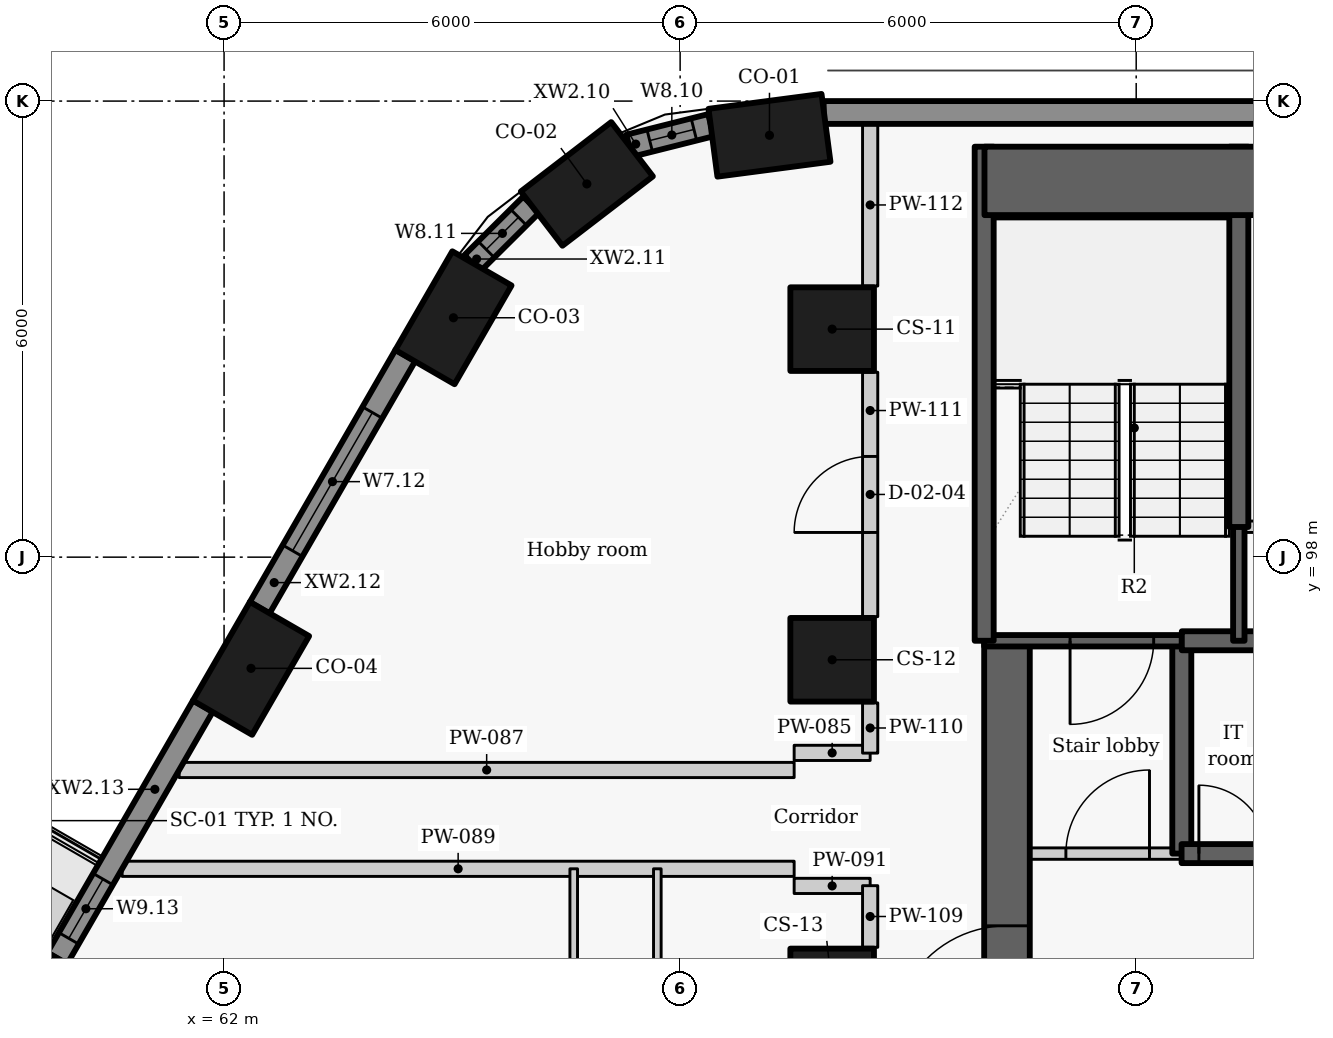
"""IFC4 building model, lengths in metres.
Left out: names, types, materials, properties, quantities, classifications, styles, units other than length and angle.
Written with IfcOpenShell. Run it as: python <this file> out.ifc"""

import sys

from ifc_helpers import new_model, si_unit, direction, frame, frame_2d, origin, origin_2d, place, context, subcontext, project, spatial, rectangle, extrude, element, fill, save


model = new_model("IFC4")
c1 = context("Model", 3, precision=1e-05, world=origin(), true_north=direction((0.0, 1.0)))
c2 = subcontext(c1, "Body", "Model", "MODEL_VIEW")
j1 = project(units=[si_unit("LENGTHUNIT", "METRE"), si_unit("PLANEANGLEUNIT", "RADIAN")], contexts=[c1])
p1 = place(None, origin())
s1 = spatial("IfcSite", under=j1, at=p1, CompositionType="ELEMENT")
p2 = place(p1, origin())
s2 = spatial("IfcBuilding", under=s1, at=p2, CompositionType="ELEMENT")
p3 = place(p2, frame((0.0, 0.0, 44.7)))
s3 = spatial("IfcBuildingStorey", under=s2, at=p3, CompositionType="ELEMENT", Elevation=44.7)
for number, where, z_axis, x_axis in (
    (1, (69.175, 103.55, 0.0), (0.0, 0.0, 1.0), (-0.991, -0.131, 0.0)),
    (2, (66.773, 102.91, 0.0), (0.0, 0.0, 1.0), (-0.793, -0.609, 0.0)),
    (3, (65.018, 101.149, 0.0), (0.0, 0.0, 1.0), (-0.5, -0.866, 0.0)),
    (4, (62.354, 96.537, 0.0), (0.0, 0.0, 1.0), (-0.5, -0.866, 0.0)),
    (5, (59.692, 91.925, 0.0), (0.0, 0.0, 1.0), (-0.5, -0.866, 0.0)),
):
    element("IfcColumn", number, at=place(p3, frame(where, z_axis=z_axis, x_axis=x_axis)), inside=s3, PredefinedType="COLUMN", context=c2, shape_type="SweptSolid", body=[
        extrude(rectangle(XDim=1.5, YDim=0.9, at=origin_2d()), origin(), (0.0, 0.0, 1.0), 3.3),
    ])
for number, where, z_axis, x_axis in (
    (6, (70.0, 101.0, 0.0), (0.0, 0.0, 1.0), (0.0, -1.0, 0.0)),
    (7, (70.0, 96.65, 0.0), (0.0, 0.0, 1.0), (0.0, -1.0, 0.0)),
    (8, (70.0, 92.3, 0.0), (0.0, 0.0, 1.0), (0.0, -1.0, 0.0)),
):
    element("IfcColumn", number, at=place(p3, frame(where, z_axis=z_axis, x_axis=x_axis)), inside=s3, PredefinedType="COLUMN", context=c2, shape_type="SweptSolid", body=[
        extrude(rectangle(XDim=1.1, YDim=1.1, at=origin_2d()), origin(), (0.0, 0.0, 1.0), 3.3),
    ])
p4 = place(p3, frame((90.079, 103.85, 0.0), z_axis=(0.0, 0.0, 1.0), x_axis=(-1.0, 0.0, 0.0)))
e9 = element("IfcWall", 9, at=p4, inside=s3, PredefinedType="SOLIDWALL", context=c2, shape_type="SweptSolid", body=[
    extrude(rectangle(XDim=20.19, YDim=0.3, at=frame_2d((10.095, 0.0))), origin(), (0.0, 0.0, 1.0), 2.425),
])
p5 = place(p3, frame((68.405, 103.683, 0.0), z_axis=(0.0, 0.0, 1.0), x_axis=(-0.969766298956, -0.244035500304, 0.0)))
e10 = element("IfcWall", 10, at=p5, inside=s3, PredefinedType="SOLIDWALL", context=c2, shape_type="SweptSolid", body=[
    extrude(rectangle(XDim=1.111, YDim=0.3, at=frame_2d((0.555, 0.0))), origin(), (0.0, 0.0, 1.0), 2.425),
])
p6 = place(p5, frame((0.231, 0.0, 0.9)))
e11 = element("IfcOpeningElement", 11, at=p6, cuts=e10, PredefinedType="OPENING", context=c2, shape_type="SweptSolid", body=[
    extrude(rectangle(XDim=0.6, YDim=1.1, at=frame_2d((0.3, 0.55))), frame((0.0, 0.16, 0.0), z_axis=(0.0, -1.0, 0.0), x_axis=(1.0, 0.0, 0.0)), (0.0, 0.0, 1.0), 0.32),
])
p7 = place(p3, frame((66.042, 102.637, 0.0), z_axis=(0.0, 0.0, 1.0), x_axis=(-0.708892395813, -0.705316646024, 0.0)))
e12 = element("IfcWall", 12, at=p7, inside=s3, PredefinedType="SOLIDWALL", context=c2, shape_type="SweptSolid", body=[
    extrude(rectangle(XDim=1.093, YDim=0.3, at=frame_2d((0.546, 0.0))), origin(), (0.0, 0.0, 1.0), 2.425),
])
p8 = place(p7, frame((0.236, 0.0, 0.9)))
e13 = element("IfcOpeningElement", 13, at=p8, cuts=e12, PredefinedType="OPENING", context=c2, shape_type="SweptSolid", body=[
    extrude(rectangle(XDim=0.6, YDim=1.1, at=frame_2d((0.3, 0.55))), frame((0.0, 0.16, 0.0), z_axis=(0.0, -1.0, 0.0), x_axis=(1.0, 0.0, 0.0)), (0.0, 0.0, 1.0), 0.32),
])
p9 = place(p3, frame((64.385, 100.654, 0.0), z_axis=(0.0, 0.0, 1.0), x_axis=(-0.499974163209, -0.866040320149, 0.0)))
e14 = element("IfcWall", 14, at=p9, inside=s3, PredefinedType="SOLIDWALL", context=c2, shape_type="SweptSolid", body=[
    extrude(rectangle(XDim=3.834, YDim=0.3, at=frame_2d((1.917, 0.0))), origin(), (0.0, 0.0, 1.0), 2.425),
])
p10 = place(p9, frame((0.867, 0.0, 0.9)))
e15 = element("IfcOpeningElement", 15, at=p10, cuts=e14, PredefinedType="OPENING", context=c2, shape_type="SweptSolid", body=[
    extrude(rectangle(XDim=2.1, YDim=1.1, at=frame_2d((1.05, 0.55))), frame((0.0, 0.16, 0.0), z_axis=(0.0, -1.0, 0.0), x_axis=(1.0, 0.0, 0.0)), (0.0, 0.0, 1.0), 0.32),
])
p11 = place(p3, frame((61.722, 96.041, 0.0), z_axis=(0.0, 0.0, 1.0), x_axis=(-0.500001735503, -0.866024401789, 0.0)))
e16 = element("IfcWall", 16, at=p11, inside=s3, PredefinedType="SOLIDWALL", context=c2, shape_type="SweptSolid", body=[
    extrude(rectangle(XDim=3.834, YDim=0.3, at=frame_2d((1.917, 0.0))), origin(), (0.0, 0.0, 1.0), 2.425),
])
p12 = place(p11, frame((2.629, 0.0, 0.9)))
e17 = element("IfcOpeningElement", 17, at=p12, cuts=e16, PredefinedType="OPENING", context=c2, shape_type="SweptSolid", body=[
    extrude(rectangle(XDim=0.9, YDim=1.1, at=frame_2d((0.45, 0.55))), frame((0.0, 0.16, 0.0), z_axis=(0.0, -1.0, 0.0), x_axis=(1.0, 0.0, 0.0)), (0.0, 0.0, 1.0), 0.32),
])
p13 = place(p3, frame((74.6, 94.1, -0.275), z_axis=(0.0, 0.0, 1.0), x_axis=(0.0, 1.0, 0.0)))
e18 = element("IfcWall", 18, at=p13, inside=s3, PredefinedType="SHEAR", context=c2, shape_type="SweptSolid", body=[
    extrude(rectangle(XDim=2.8, YDim=0.25, at=frame_2d((1.4, 0.0))), origin(), (0.0, 0.0, 1.0), 3.3),
])
p14 = place(p3, frame((72.3, 87.8, -0.275), z_axis=(0.0, 0.0, 1.0), x_axis=(0.0, 1.0, 0.0)))
e19 = element("IfcWall", 19, at=p14, inside=s3, PredefinedType="SHEAR", context=c2, shape_type="SweptSolid", body=[
    extrude(rectangle(XDim=9.1, YDim=0.6, at=frame_2d((4.55, 0.0))), origin(), (0.0, 0.0, 1.0), 3.3),
])
p15 = place(p14, frame((3.85, 0.0, 0.275)))
e20 = element("IfcOpeningElement", 20, at=p15, cuts=e19, PredefinedType="OPENING", context=c2, shape_type="SweptSolid", body=[
    extrude(rectangle(XDim=1.5, YDim=2.1, at=frame_2d((0.75, 1.05))), frame((0.0, 0.31, 0.0), z_axis=(0.0, -1.0, 0.0), x_axis=(1.0, 0.0, 0.0)), (0.0, 0.0, 1.0), 0.62),
])
p16 = place(p3, frame((72.0, 94.1, 0.0), z_axis=(0.0, 0.0, 1.0), x_axis=(1.0, 0.0, 0.0)))
e21 = element("IfcWall", 21, at=p16, inside=s3, PredefinedType="PARTITIONING", context=c2, shape_type="SweptSolid", body=[
    extrude(rectangle(XDim=2.603, YDim=0.15, at=frame_2d((1.302, 0.0))), origin(), (0.0, 0.0, 1.0), 3.025),
])
p17 = place(p16, frame((1.075, 0.0, 0.0)))
e22 = element("IfcOpeningElement", 22, at=p17, cuts=e21, PredefinedType="OPENING", context=c2, shape_type="SweptSolid", body=[
    extrude(rectangle(XDim=1.1, YDim=2.1, at=frame_2d((0.55, 1.05))), frame((0.0, 0.085, 0.0), z_axis=(0.0, -1.0, 0.0), x_axis=(1.0, 0.0, 0.0)), (0.0, 0.0, 1.0), 0.17),
])
p18 = place(p3, frame((74.597, 94.1, -0.275), z_axis=(0.0, 0.0, 1.0), x_axis=(1.0, 0.0, 0.0)))
e23 = element("IfcWall", 23, at=p18, inside=s3, PredefinedType="SHEAR", context=c2, shape_type="SweptSolid", body=[
    extrude(rectangle(XDim=2.706, YDim=0.25, at=frame_2d((1.353, 0.0))), origin(), (0.0, 0.0, 1.0), 3.3),
])
p19 = place(p18, frame((0.228, 0.0, 0.275)))
e24 = element("IfcOpeningElement", 24, at=p19, cuts=e23, PredefinedType="OPENING", context=c2, shape_type="SweptSolid", body=[
    extrude(rectangle(XDim=0.9, YDim=2.1, at=frame_2d((0.45, 1.05))), frame((0.0, 0.135, 0.0), z_axis=(0.0, -1.0, 0.0), x_axis=(1.0, 0.0, 0.0)), (0.0, 0.0, 1.0), 0.27),
])
p20 = place(p18, frame((1.578, 0.0, 0.275)))
e25 = element("IfcOpeningElement", 25, at=p20, cuts=e23, PredefinedType="OPENING", context=c2, shape_type="SweptSolid", body=[
    extrude(rectangle(XDim=0.9, YDim=2.1, at=frame_2d((0.45, 1.05))), frame((0.0, 0.135, 0.0), z_axis=(0.0, -1.0, 0.0), x_axis=(1.0, 0.0, 0.0)), (0.0, 0.0, 1.0), 0.27),
])
p21 = place(p3, frame((74.6, 96.9, -0.275), z_axis=(0.0, 0.0, 1.0), x_axis=(-1.0, 0.0, 0.0)))
e26 = element("IfcWall", 26, at=p21, inside=s3, PredefinedType="SHEAR", context=c2, shape_type="SweptSolid", body=[
    extrude(rectangle(XDim=2.6, YDim=0.15, at=frame_2d((1.3, 0.0))), origin(), (0.0, 0.0, 1.0), 3.3),
])
p22 = place(p21, frame((0.37, 0.0, 0.275)))
e27 = element("IfcOpeningElement", 27, at=p22, cuts=e26, PredefinedType="OPENING", context=c2, shape_type="SweptSolid", body=[
    extrude(rectangle(XDim=1.1, YDim=2.1, at=frame_2d((0.55, 1.05))), frame((0.0, 0.085, 0.0), z_axis=(0.0, -1.0, 0.0), x_axis=(1.0, 0.0, 0.0)), (0.0, 0.0, 1.0), 0.17),
])
p23 = place(p3, frame((74.6, 96.9, -0.275), z_axis=(0.0, 0.0, 1.0), x_axis=(1.0, 0.0, 0.0)))
e28 = element("IfcWall", 28, at=p23, inside=s3, PredefinedType="SHEAR", context=c2, shape_type="SweptSolid", body=[
    extrude(rectangle(XDim=2.7, YDim=0.25, at=frame_2d((1.35, 0.0))), origin(), (0.0, 0.0, 1.0), 3.3),
])
p24 = place(p3, frame((75.35, 96.9, -0.275), z_axis=(0.0, 0.0, 1.0), x_axis=(0.0, 1.0, 0.0)))
e29 = element("IfcWall", 29, at=p24, inside=s3, PredefinedType="SHEAR", context=c2, shape_type="SweptSolid", body=[
    extrude(rectangle(XDim=1.503, YDim=0.15, at=frame_2d((0.751, 0.0))), origin(), (0.0, 0.0, 1.0), 3.3),
])
p25 = place(p3, frame((75.35, 98.397, -0.275), z_axis=(0.0, 0.0, 1.0), x_axis=(0.0, 1.0, 0.0)))
e30 = element("IfcWall", 30, at=p25, inside=s3, PredefinedType="SHEAR", context=c2, shape_type="SweptSolid", body=[
    extrude(rectangle(XDim=5.003, YDim=0.25, at=frame_2d((2.501, 0.0))), origin(), (0.0, 0.0, 1.0), 3.3),
])
p26 = place(p3, frame((72.0, 96.9, -0.275), z_axis=(0.0, 0.0, 1.0), x_axis=(0.0, 1.0, 0.0)))
e31 = element("IfcWall", 31, at=p26, inside=s3, PredefinedType="SHEAR", context=c2, shape_type="SweptSolid", body=[
    extrude(rectangle(XDim=6.5, YDim=0.25, at=frame_2d((3.25, 0.0))), origin(), (0.0, 0.0, 1.0), 3.3),
])
p27 = place(p3, frame((75.35, 98.4, 0.0), z_axis=(0.0, 0.0, 1.0), x_axis=(1.0, 0.0, 0.0)))
e32 = element("IfcWall", 32, at=p27, inside=s3, PredefinedType="PARTITIONING", context=c2, shape_type="SweptSolid", body=[
    extrude(rectangle(XDim=5.2, YDim=0.15, at=frame_2d((2.6, 0.0))), origin(), (0.0, 0.0, 1.0), 3.025),
])
p28 = place(p27, frame((0.434, 0.0, 0.0)))
e33 = element("IfcOpeningElement", 33, at=p28, cuts=e32, PredefinedType="OPENING", context=c2, shape_type="SweptSolid", body=[
    extrude(rectangle(XDim=0.9, YDim=2.1, at=frame_2d((0.45, 1.05))), frame((0.0, 0.085, 0.0), z_axis=(0.0, -1.0, 0.0), x_axis=(1.0, 0.0, 0.0)), (0.0, 0.0, 1.0), 0.17),
])
p29 = place(p27, frame((2.176, 0.0, 0.0)))
e34 = element("IfcOpeningElement", 34, at=p29, cuts=e32, PredefinedType="OPENING", context=c2, shape_type="SweptSolid", body=[
    extrude(rectangle(XDim=0.9, YDim=2.1, at=frame_2d((0.45, 1.05))), frame((0.0, 0.085, 0.0), z_axis=(0.0, -1.0, 0.0), x_axis=(1.0, 0.0, 0.0)), (0.0, 0.0, 1.0), 0.17),
])
p30 = place(p27, frame((3.892, 0.0, 0.0)))
e35 = element("IfcOpeningElement", 35, at=p30, cuts=e32, PredefinedType="OPENING", context=c2, shape_type="SweptSolid", body=[
    extrude(rectangle(XDim=0.9, YDim=2.1, at=frame_2d((0.45, 1.05))), frame((0.0, 0.085, 0.0), z_axis=(0.0, -1.0, 0.0), x_axis=(1.0, 0.0, 0.0)), (0.0, 0.0, 1.0), 0.17),
])
p31 = place(p3, frame((69.5, 95.425, 0.0), z_axis=(0.0, 0.0, 1.0), x_axis=(1.0, 0.0, 0.0)))
e36 = element("IfcWall", 36, at=p31, inside=s3, PredefinedType="PARTITIONING", context=c2, shape_type="SweptSolid", body=[
    extrude(rectangle(XDim=1.0, YDim=0.2, at=frame_2d((0.5, 0.0))), origin(), (0.0, 0.0, 1.0), 2.505),
])
p32 = place(p3, frame((61.409, 95.2, 0.0), z_axis=(0.0, 0.0, 1.0), x_axis=(1.0, 0.0, 0.0)))
e37 = element("IfcWall", 37, at=p32, inside=s3, PredefinedType="PARTITIONING", context=c2, shape_type="SweptSolid", body=[
    extrude(rectangle(XDim=8.091, YDim=0.2, at=frame_2d((4.045, 0.0))), origin(), (0.0, 0.0, 1.0), 2.405),
])
p33 = place(p3, frame((60.659, 93.9, 0.0), z_axis=(0.0, 0.0, 1.0), x_axis=(1.0, 0.0, 0.0)))
e38 = element("IfcWall", 38, at=p33, inside=s3, PredefinedType="PARTITIONING", context=c2, shape_type="SweptSolid", body=[
    extrude(rectangle(XDim=8.841, YDim=0.2, at=frame_2d((4.421, 0.0))), origin(), (0.0, 0.0, 1.0), 2.405),
])
p34 = place(p3, frame((69.5, 93.675, 0.0), z_axis=(0.0, 0.0, 1.0), x_axis=(1.0, 0.0, 0.0)))
e39 = element("IfcWall", 39, at=p34, inside=s3, PredefinedType="PARTITIONING", context=c2, shape_type="SweptSolid", body=[
    extrude(rectangle(XDim=1.0, YDim=0.2, at=frame_2d((0.5, 0.0))), origin(), (0.0, 0.0, 1.0), 2.505),
])
p35 = place(p3, frame((70.5, 92.867, 0.0), z_axis=(0.0, 0.0, 1.0), x_axis=(0.0, 1.0, 0.0)))
e40 = element("IfcWall", 40, at=p35, inside=s3, PredefinedType="PARTITIONING", context=c2, shape_type="SweptSolid", body=[
    extrude(rectangle(XDim=0.811, YDim=0.2, at=frame_2d((0.406, 0.0))), origin(), (0.0, 0.0, 1.0), 3.025),
])
p36 = place(p3, frame((70.5, 95.422, 0.0), z_axis=(0.0, 0.0, 1.0), x_axis=(0.0, 1.0, 0.0)))
e41 = element("IfcWall", 41, at=p36, inside=s3, PredefinedType="PARTITIONING", context=c2, shape_type="SweptSolid", body=[
    extrude(rectangle(XDim=0.661, YDim=0.2, at=frame_2d((0.331, 0.0))), origin(), (0.0, 0.0, 1.0), 3.025),
])
p37 = place(p3, frame((70.5, 97.217, 0.0), z_axis=(0.0, 0.0, 1.0), x_axis=(0.0, 1.0, 0.0)))
e42 = element("IfcWall", 42, at=p37, inside=s3, PredefinedType="PARTITIONING", context=c2, shape_type="SweptSolid", body=[
    extrude(rectangle(XDim=3.216, YDim=0.2, at=frame_2d((1.608, 0.0))), origin(), (0.0, 0.0, 1.0), 3.025),
])
p38 = place(p37, frame((1.108, 0.0, 0.0)))
e43 = element("IfcOpeningElement", 43, at=p38, cuts=e42, PredefinedType="OPENING", context=c2, shape_type="SweptSolid", body=[
    extrude(rectangle(XDim=1.0, YDim=2.1, at=frame_2d((0.5, 1.05))), frame((0.0, 0.11, 0.0), z_axis=(0.0, -1.0, 0.0), x_axis=(1.0, 0.0, 0.0)), (0.0, 0.0, 1.0), 0.22),
])
p39 = place(p3, frame((70.5, 101.567, 0.0), z_axis=(0.0, 0.0, 1.0), x_axis=(0.0, 1.0, 0.0)))
e44 = element("IfcWall", 44, at=p39, inside=s3, PredefinedType="PARTITIONING", context=c2, shape_type="SweptSolid", body=[
    extrude(rectangle(XDim=2.133, YDim=0.2, at=frame_2d((1.066, 0.0))), origin(), (0.0, 0.0, 1.0), 3.025),
])
p40 = place(p3, frame((67.7, 93.9, 0.0), z_axis=(0.0, 0.0, 1.0), x_axis=(0.0, -1.0, 0.0)))
e45 = element("IfcWall", 45, at=p40, inside=s3, PredefinedType="PARTITIONING", context=c2, shape_type="SweptSolid", body=[
    extrude(rectangle(XDim=9.2, YDim=0.1, at=frame_2d((4.6, 0.0))), origin(), (0.0, 0.0, 1.0), 3.025),
])
p41 = place(p40, frame((6.684, 0.0, 0.0)))
e46 = element("IfcOpeningElement", 46, at=p41, cuts=e45, PredefinedType="OPENING", context=c2, shape_type="SweptSolid", body=[
    extrude(rectangle(XDim=0.85, YDim=2.1, at=frame_2d((0.425, 1.05))), frame((0.0, 0.06, 0.0), z_axis=(0.0, -1.0, 0.0), x_axis=(1.0, 0.0, 0.0)), (0.0, 0.0, 1.0), 0.12),
])
p42 = place(p40, frame((2.059, 0.0, 0.0)))
e47 = element("IfcOpeningElement", 47, at=p42, cuts=e45, PredefinedType="OPENING", context=c2, shape_type="SweptSolid", body=[
    extrude(rectangle(XDim=0.9, YDim=2.1, at=frame_2d((0.45, 1.05))), frame((0.0, 0.06, 0.0), z_axis=(0.0, -1.0, 0.0), x_axis=(1.0, 0.0, 0.0)), (0.0, 0.0, 1.0), 0.12),
])
p43 = place(p3, frame((66.6, 72.0, 0.0), z_axis=(0.0, 0.0, 1.0), x_axis=(0.0, 1.0, 0.0)))
e48 = element("IfcWall", 48, at=p43, inside=s3, PredefinedType="PARTITIONING", context=c2, shape_type="SweptSolid", body=[
    extrude(rectangle(XDim=21.9, YDim=0.1, at=frame_2d((10.95, 0.0))), origin(), (0.0, 0.0, 1.0), 3.025),
])
p44 = place(p43, frame((1.161, 0.0, 0.0)))
e49 = element("IfcOpeningElement", 49, at=p44, cuts=e48, PredefinedType="OPENING", context=c2, shape_type="SweptSolid", body=[
    extrude(rectangle(XDim=0.9, YDim=2.1, at=frame_2d((0.45, 1.05))), frame((0.0, 0.06, 0.0), z_axis=(0.0, -1.0, 0.0), x_axis=(1.0, 0.0, 0.0)), (0.0, 0.0, 1.0), 0.12),
])
p45 = place(p43, frame((4.384, 0.0, 0.0)))
e50 = element("IfcOpeningElement", 50, at=p45, cuts=e48, PredefinedType="OPENING", context=c2, shape_type="SweptSolid", body=[
    extrude(rectangle(XDim=0.9, YDim=2.1, at=frame_2d((0.45, 1.05))), frame((0.0, 0.06, 0.0), z_axis=(0.0, -1.0, 0.0), x_axis=(1.0, 0.0, 0.0)), (0.0, 0.0, 1.0), 0.12),
])
p46 = place(p43, frame((8.323, 0.0, 0.0)))
e51 = element("IfcOpeningElement", 51, at=p46, cuts=e48, PredefinedType="OPENING", context=c2, shape_type="SweptSolid", body=[
    extrude(rectangle(XDim=0.9, YDim=2.1, at=frame_2d((0.45, 1.05))), frame((0.0, 0.06, 0.0), z_axis=(0.0, -1.0, 0.0), x_axis=(1.0, 0.0, 0.0)), (0.0, 0.0, 1.0), 0.12),
])
p47 = place(p43, frame((12.218, 0.0, 0.0)))
e52 = element("IfcOpeningElement", 52, at=p47, cuts=e48, PredefinedType="OPENING", context=c2, shape_type="SweptSolid", body=[
    extrude(rectangle(XDim=0.9, YDim=2.1, at=frame_2d((0.45, 1.05))), frame((0.0, 0.06, 0.0), z_axis=(0.0, -1.0, 0.0), x_axis=(1.0, 0.0, 0.0)), (0.0, 0.0, 1.0), 0.12),
])
p48 = place(p43, frame((15.353, 0.0, 0.0)))
e53 = element("IfcOpeningElement", 53, at=p48, cuts=e48, PredefinedType="OPENING", context=c2, shape_type="SweptSolid", body=[
    extrude(rectangle(XDim=0.9, YDim=2.1, at=frame_2d((0.45, 1.05))), frame((0.0, 0.06, 0.0), z_axis=(0.0, -1.0, 0.0), x_axis=(1.0, 0.0, 0.0)), (0.0, 0.0, 1.0), 0.12),
])
p49 = place(p43, frame((19.186, 0.0, 0.0)))
e54 = element("IfcOpeningElement", 54, at=p49, cuts=e48, PredefinedType="OPENING", context=c2, shape_type="SweptSolid", body=[
    extrude(rectangle(XDim=0.9, YDim=2.1, at=frame_2d((0.45, 1.05))), frame((0.0, 0.06, 0.0), z_axis=(0.0, -1.0, 0.0), x_axis=(1.0, 0.0, 0.0)), (0.0, 0.0, 1.0), 0.12),
])
p50 = place(p3, frame((72.004, 102.95, -0.275), z_axis=(0.0, 0.0, 1.0), x_axis=(1.0, 0.0, 0.0)))
e55 = element("IfcWall", 55, at=p50, inside=s3, PredefinedType="SHEAR", context=c2, shape_type="SweptSolid", body=[
    extrude(rectangle(XDim=15.992, YDim=0.9, at=frame_2d((7.996, 0.0))), origin(), (0.0, 0.0, 1.0), 3.3),
])
p51 = place(p6, origin())
e56 = element("IfcWindow", 56, at=p51, inside=s3, PartitioningType="SINGLE_PANEL", PredefinedType="WINDOW", context=c2, shape_type="SweptSolid", body=[
    extrude(rectangle(XDim=0.6, YDim=1.1, at=frame_2d((0.3, 0.55))), frame((0.0, 0.03, 0.0), z_axis=(0.0, -1.0, 0.0), x_axis=(1.0, 0.0, 0.0)), (0.0, 0.0, 1.0), 0.06),
])
fill(e11, e56)
p52 = place(p8, origin())
e57 = element("IfcWindow", 57, at=p52, inside=s3, PartitioningType="SINGLE_PANEL", PredefinedType="WINDOW", context=c2, shape_type="SweptSolid", body=[
    extrude(rectangle(XDim=0.6, YDim=1.1, at=frame_2d((0.3, 0.55))), frame((0.0, 0.03, 0.0), z_axis=(0.0, -1.0, 0.0), x_axis=(1.0, 0.0, 0.0)), (0.0, 0.0, 1.0), 0.06),
])
fill(e13, e57)
p53 = place(p10, origin())
e58 = element("IfcWindow", 58, at=p53, inside=s3, PartitioningType="SINGLE_PANEL", PredefinedType="WINDOW", context=c2, shape_type="SweptSolid", body=[
    extrude(rectangle(XDim=2.1, YDim=1.1, at=frame_2d((1.05, 0.55))), frame((0.0, 0.03, 0.0), z_axis=(0.0, -1.0, 0.0), x_axis=(1.0, 0.0, 0.0)), (0.0, 0.0, 1.0), 0.06),
])
fill(e15, e58)
p54 = place(p12, origin())
e59 = element("IfcWindow", 59, at=p54, inside=s3, PartitioningType="SINGLE_PANEL", PredefinedType="WINDOW", context=c2, shape_type="SweptSolid", body=[
    extrude(rectangle(XDim=0.9, YDim=1.1, at=frame_2d((0.45, 0.55))), frame((0.0, 0.03, 0.0), z_axis=(0.0, -1.0, 0.0), x_axis=(1.0, 0.0, 0.0)), (0.0, 0.0, 1.0), 0.06),
])
fill(e17, e59)
p55 = place(p17, origin())
e60 = element("IfcDoor", 60, at=p55, inside=s3, OperationType="SINGLE_SWING_RIGHT", PredefinedType="DOOR", context=c2, shape_type="SweptSolid", body=[
    extrude(rectangle(XDim=1.1, YDim=2.1, at=frame_2d((0.55, 1.05))), frame((0.0, 0.025, 0.0), z_axis=(0.0, -1.0, 0.0), x_axis=(1.0, 0.0, 0.0)), (0.0, 0.0, 1.0), 0.05),
])
fill(e22, e60)
p56 = place(p19, origin())
e61 = element("IfcDoor", 61, at=p56, inside=s3, OperationType="SINGLE_SWING_LEFT", PredefinedType="DOOR", context=c2, shape_type="SweptSolid", body=[
    extrude(rectangle(XDim=0.9, YDim=2.1, at=frame_2d((0.45, 1.05))), frame((0.0, 0.025, 0.0), z_axis=(0.0, -1.0, 0.0), x_axis=(1.0, 0.0, 0.0)), (0.0, 0.0, 1.0), 0.05),
])
fill(e24, e61)
p57 = place(p22, origin())
e62 = element("IfcDoor", 62, at=p57, inside=s3, OperationType="SINGLE_SWING_RIGHT", PredefinedType="DOOR", context=c2, shape_type="SweptSolid", body=[
    extrude(rectangle(XDim=1.1, YDim=2.1, at=frame_2d((0.55, 1.05))), frame((0.0, 0.025, 0.0), z_axis=(0.0, -1.0, 0.0), x_axis=(1.0, 0.0, 0.0)), (0.0, 0.0, 1.0), 0.05),
])
fill(e27, e62)
p58 = place(p38, origin())
e63 = element("IfcDoor", 63, at=p58, inside=s3, OperationType="SINGLE_SWING_LEFT", PredefinedType="DOOR", context=c2, shape_type="SweptSolid", body=[
    extrude(rectangle(XDim=1.0, YDim=2.1, at=frame_2d((0.5, 1.05))), frame((0.0, 0.025, 0.0), z_axis=(0.0, -1.0, 0.0), x_axis=(1.0, 0.0, 0.0)), (0.0, 0.0, 1.0), 0.05),
])
fill(e43, e63)
p59 = place(p15, origin())
e64 = element("IfcDoor", 64, at=p59, inside=s3, OperationType="DOUBLE_DOOR_SINGLE_SWING", PredefinedType="DOOR", context=c2, shape_type="SweptSolid", body=[
    extrude(rectangle(XDim=1.5, YDim=2.1, at=frame_2d((0.75, 1.05))), frame((0.0, 0.025, 0.0), z_axis=(0.0, -1.0, 0.0), x_axis=(1.0, 0.0, 0.0)), (0.0, 0.0, 1.0), 0.05),
])
fill(e20, e64)
save(model, sys.argv[1])
